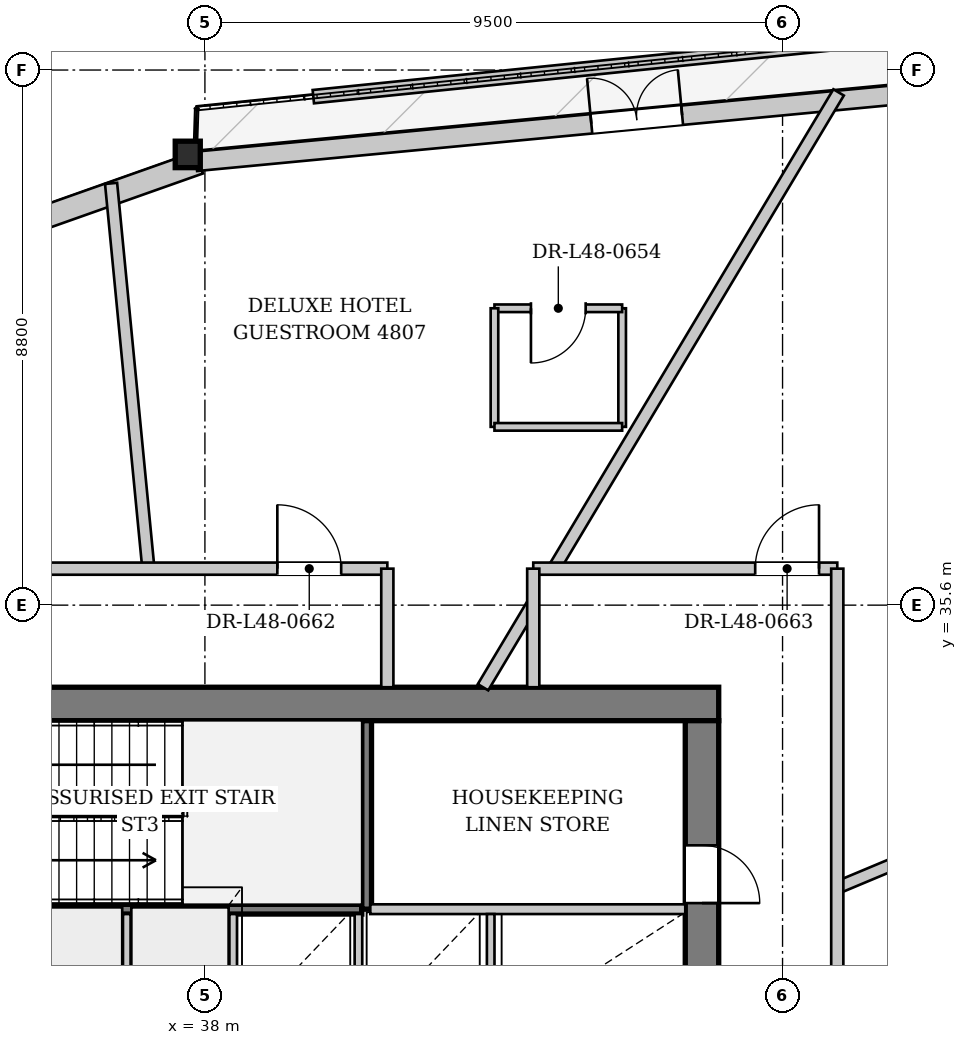
"""IFC4 building model, lengths in metres.
Left out: names, types, materials, properties, quantities, classifications, styles, units other than length and angle.
Written with IfcOpenShell. Run it as: python <this file> out.ifc"""

import sys

from ifc_helpers import new_model, si_unit, direction, frame, frame_2d, origin, origin_2d, place, context, subcontext, project, spatial, rectangle, i_section, extrude, source, transform, mapped, element, fill, save


model = new_model("IFC4")
c1 = context("Model", 3, precision=1e-05, world=origin(), true_north=direction((0.0, 1.0)))
c2 = subcontext(c1, "Body", "Model", "MODEL_VIEW")
j1 = project(units=[si_unit("LENGTHUNIT", "METRE"), si_unit("PLANEANGLEUNIT", "RADIAN")], contexts=[c1])
p1 = place(None, origin())
s1 = spatial("IfcSite", under=j1, at=p1, CompositionType="ELEMENT")
p2 = place(p1, origin())
s2 = spatial("IfcBuilding", under=s1, at=p2, CompositionType="ELEMENT")
p3 = place(p2, frame((0.0, 0.0, 182.1)))
s3 = spatial("IfcBuildingStorey", under=s2, at=p3, CompositionType="ELEMENT", Elevation=182.1)
m1 = source(origin(), c2, "Body", "SweptSolid", [
    extrude(i_section(OverallWidth=0.412, OverallDepth=0.435, WebThickness=0.031, FlangeThickness=0.05, at=origin_2d()), origin(), (0.0, 0.0, 1.0), 3.395),
])
p4 = place(p3, frame((37.842, 43.058, 0.0), z_axis=(-0.072913032199, -0.026677253398, 0.996981451125), x_axis=(0.343601453604, -0.93911556322, 0.0)))
e1 = element("IfcColumn", 1, at=p4, inside=s3, PredefinedType="COLUMN", context=c2, shape_type="MappedRepresentation", body=[
    mapped(m1, transform((0.0, 0.0, 0.0), x_axis=(1.0, 0.0, 0.0), y_axis=(0.0, 1.0, 0.0), z_axis=(0.0, 0.0, 1.0), scale=1.0)),
])
p5 = place(p3, frame((16.463, 35.293, 0.0), z_axis=(0.0, 0.0, 1.0), x_axis=(0.94274891149, 0.33350335813, 0.0)))
e2 = element("IfcWall", 2, at=p5, inside=s3, PredefinedType="SOLIDWALL", context=c2, shape_type="SweptSolid", body=[
    extrude(rectangle(XDim=22.744, YDim=0.38, at=frame_2d((11.372, 0.0))), origin(), (0.0, 0.0, 1.0), 2.722),
])
p6 = place(p5, frame((5.268, 0.0, 0.352)))
e3 = element("IfcOpeningElement", 3, at=p6, cuts=e2, PredefinedType="OPENING", context=c2, shape_type="SweptSolid", body=[
    extrude(rectangle(XDim=2.2, YDim=2.25, at=frame_2d((1.1, 1.125))), frame((0.0, 0.2, 0.0), z_axis=(0.0, -1.0, 0.0), x_axis=(1.0, 0.0, 0.0)), (0.0, 0.0, 1.0), 0.4),
])
p7 = place(p5, frame((15.276, 0.0, 0.352)))
e4 = element("IfcOpeningElement", 4, at=p7, cuts=e2, PredefinedType="OPENING", context=c2, shape_type="SweptSolid", body=[
    extrude(rectangle(XDim=2.2, YDim=2.25, at=frame_2d((1.1, 1.125))), frame((0.0, 0.2, 0.0), z_axis=(0.0, -1.0, 0.0), x_axis=(1.0, 0.0, 0.0)), (0.0, 0.0, 1.0), 0.4),
])
p8 = place(p3, frame((37.857, 42.898, 0.0), z_axis=(0.0, 0.0, 1.0), x_axis=(0.995520332202, 0.094547703155, 0.0)))
e5 = element("IfcWall", 5, at=p8, inside=s3, PredefinedType="SOLIDWALL", context=c2, shape_type="SweptSolid", body=[
    extrude(rectangle(XDim=22.744, YDim=0.32, at=frame_2d((11.372, 0.0))), origin(), (0.0, 0.0, 1.0), 2.722),
])
p9 = place(p8, frame((6.528, 0.0, 0.0)))
e6 = element("IfcOpeningElement", 6, at=p9, cuts=e5, PredefinedType="OPENING", context=c2, shape_type="SweptSolid", body=[
    extrude(rectangle(XDim=1.5, YDim=2.3, at=frame_2d((0.75, 1.15))), frame((0.0, 0.17, 0.0), z_axis=(0.0, -1.0, 0.0), x_axis=(1.0, 0.0, 0.0)), (0.0, 0.0, 1.0), 0.34),
])
p10 = place(p8, frame((15.531, 0.0, 0.252)))
e7 = element("IfcOpeningElement", 7, at=p10, cuts=e5, PredefinedType="OPENING", context=c2, shape_type="SweptSolid", body=[
    extrude(rectangle(XDim=2.6, YDim=2.35, at=frame_2d((1.3, 1.175))), frame((0.0, 0.17, 0.0), z_axis=(0.0, -1.0, 0.0), x_axis=(1.0, 0.0, 0.0)), (0.0, 0.0, 1.0), 0.34),
])
p11 = place(p3, frame((59.927, 46.017, 0.0), z_axis=(0.0, 0.0, 1.0), x_axis=(-0.994838142645, -0.101474479251, 0.0)))
e8 = element("IfcWall", 8, at=p11, inside=s3, PredefinedType="PARAPET", context=c2, shape_type="SweptSolid", body=[
    extrude(rectangle(XDim=20.248, YDim=0.22, at=frame_2d((10.124, 0.0))), origin(), (0.0, 0.0, 1.0), 0.3),
])
p12 = place(p3, frame((29.55, 33.975, 0.0), z_axis=(0.0, 0.0, 1.0), x_axis=(1.0, 0.0, 0.0)))
e9 = element("IfcWall", 9, at=p12, inside=s3, PredefinedType="SHEAR", context=c2, shape_type="SweptSolid", body=[
    extrude(rectangle(XDim=16.9, YDim=0.55, at=frame_2d((8.45, 0.0))), origin(), (0.0, 0.0, 1.0), 3.33),
])
p13 = place(p12, frame((1.55, 0.0, 0.0)))
e10 = element("IfcOpeningElement", 10, at=p13, cuts=e9, PredefinedType="OPENING", context=c2, shape_type="SweptSolid", body=[
    extrude(rectangle(XDim=0.95, YDim=2.1, at=frame_2d((0.475, 1.05))), frame((0.0, 0.285, 0.0), z_axis=(0.0, -1.0, 0.0), x_axis=(1.0, 0.0, 0.0)), (0.0, 0.0, 1.0), 0.57),
])
p14 = place(p12, frame((3.93, 0.0, 0.0)))
e11 = element("IfcOpeningElement", 11, at=p14, cuts=e9, PredefinedType="OPENING", context=c2, shape_type="SweptSolid", body=[
    extrude(rectangle(XDim=1.32, YDim=2.2, at=frame_2d((0.66, 1.1))), frame((0.0, 0.285, 0.0), z_axis=(0.0, -1.0, 0.0), x_axis=(1.0, 0.0, 0.0)), (0.0, 0.0, 1.0), 0.57),
])
p15 = place(p3, frame((46.175, 33.7, 0.0), z_axis=(0.0, 0.0, 1.0), x_axis=(0.0, -1.0, 0.0)))
e12 = element("IfcWall", 12, at=p15, inside=s3, PredefinedType="SHEAR", context=c2, shape_type="SweptSolid", body=[
    extrude(rectangle(XDim=14.2, YDim=0.55, at=frame_2d((7.1, 0.0))), origin(), (0.0, 0.0, 1.0), 3.33),
])
p16 = place(p15, frame((5.18, 0.0, 0.0)))
e13 = element("IfcOpeningElement", 13, at=p16, cuts=e12, PredefinedType="OPENING", context=c2, shape_type="SweptSolid", body=[
    extrude(rectangle(XDim=1.6, YDim=2.2, at=frame_2d((0.8, 1.1))), frame((0.0, 0.285, 0.0), z_axis=(0.0, -1.0, 0.0), x_axis=(1.0, 0.0, 0.0)), (0.0, 0.0, 1.0), 0.57),
])
p17 = place(p15, frame((2.05, 0.0, 0.0)))
e14 = element("IfcOpeningElement", 14, at=p17, cuts=e12, PredefinedType="OPENING", context=c2, shape_type="SweptSolid", body=[
    extrude(rectangle(XDim=0.95, YDim=2.1, at=frame_2d((0.475, 1.05))), frame((0.0, 0.285, 0.0), z_axis=(0.0, -1.0, 0.0), x_axis=(1.0, 0.0, 0.0)), (0.0, 0.0, 1.0), 0.57),
])
p18 = place(p3, frame((33.28, 30.6, 0.0), z_axis=(0.0, 0.0, 1.0), x_axis=(1.0, 0.0, 0.0)))
e15 = element("IfcWall", 15, at=p18, inside=s3, PredefinedType="PARTITIONING", context=c2, shape_type="SweptSolid", body=[
    extrude(rectangle(XDim=7.3, YDim=0.16, at=frame_2d((3.65, 0.0))), origin(), (0.0, 0.0, 1.0), 3.33),
])
p19 = place(p3, frame((40.66, 30.6, 0.0), z_axis=(0.0, 0.0, 1.0), x_axis=(0.0, 1.0, 0.0)))
e16 = element("IfcWall", 16, at=p19, inside=s3, PredefinedType="PARTITIONING", context=c2, shape_type="SweptSolid", body=[
    extrude(rectangle(XDim=3.1, YDim=0.16, at=frame_2d((1.55, 0.0))), origin(), (0.0, 0.0, 1.0), 3.33),
])
p20 = place(p3, frame((40.72, 30.6, 0.0), z_axis=(0.0, 0.0, 1.0), x_axis=(1.0, 0.0, 0.0)))
e17 = element("IfcWall", 17, at=p20, inside=s3, PredefinedType="PARTITIONING", context=c2, shape_type="SweptSolid", body=[
    extrude(rectangle(XDim=5.18, YDim=0.16, at=frame_2d((2.59, 0.0))), origin(), (0.0, 0.0, 1.0), 3.33),
])
for number, where, z_axis, x_axis in (
    (18, (36.715, 28.6, 0.0), (0.0, 0.0, 1.0), (0.0, 1.0, 0.0)),
    (19, (38.465, 28.6, 0.0), (0.0, 0.0, 1.0), (0.0, 1.0, 0.0)),
    (20, (40.525, 28.6, 0.0), (0.0, 0.0, 1.0), (0.0, 1.0, 0.0)),
    (21, (42.7, 28.6, 0.0), (0.0, 0.0, 1.0), (0.0, 1.0, 0.0)),
):
    element("IfcWall", number, at=place(p3, frame(where, z_axis=z_axis, x_axis=x_axis)), inside=s3, PredefinedType="PARTITIONING", context=c2, shape_type="SweptSolid", body=[
        extrude(rectangle(XDim=1.92, YDim=0.125, at=frame_2d((0.96, 0.0))), origin(), (0.0, 0.0, 1.0), 3.33),
    ])
p21 = place(p3, frame((48.4, 30.955, 0.0), z_axis=(0.0, 0.0, 1.0), x_axis=(0.922383605096, 0.386275141641, 0.0)))
e22 = element("IfcWall", 22, at=p21, inside=s3, PredefinedType="PARTITIONING", context=c2, shape_type="SweptSolid", body=[
    extrude(rectangle(XDim=11.808, YDim=0.2, at=frame_2d((5.904, 0.0))), origin(), (0.0, 0.0, 1.0), 3.33),
])
p22 = place(p3, frame((42.573, 34.25, 0.0), z_axis=(0.0, 0.0, 1.0), x_axis=(0.513135248782, 0.858307763251, 0.0)))
e23 = element("IfcWall", 23, at=p22, inside=s3, PredefinedType="PARTITIONING", context=c2, shape_type="SweptSolid", body=[
    extrude(rectangle(XDim=1.611, YDim=0.2, at=frame_2d((0.805, 0.0))), origin(), (0.0, 0.0, 1.0), 3.33),
])
p23 = place(p3, frame((43.739, 36.2, 0.0), z_axis=(0.0, 0.0, 1.0), x_axis=(0.51314560482, 0.858301571858, 0.0)))
e24 = element("IfcWall", 24, at=p23, inside=s3, PredefinedType="PARTITIONING", context=c2, shape_type="SweptSolid", body=[
    extrude(rectangle(XDim=9.125, YDim=0.2, at=frame_2d((4.562, 0.0))), origin(), (0.0, 0.0, 1.0), 3.33),
])
p24 = place(p3, frame((37.07, 36.2, 0.0), z_axis=(0.0, 0.0, 1.0), x_axis=(-0.096381803704, 0.995344436823, 0.0)))
e25 = element("IfcWall", 25, at=p24, inside=s3, PredefinedType="PARTITIONING", context=c2, shape_type="SweptSolid", body=[
    extrude(rectangle(XDim=6.365, YDim=0.2, at=frame_2d((3.183, 0.0))), origin(), (0.0, 0.0, 1.0), 3.33),
])
p25 = place(p3, frame((44.862, 38.532, 0.0), z_axis=(0.0, 0.0, 1.0), x_axis=(0.0, 1.0, 0.0)))
e26 = element("IfcWall", 26, at=p25, inside=s3, PredefinedType="PARTITIONING", context=c2, shape_type="SweptSolid", body=[
    extrude(rectangle(XDim=1.95, YDim=0.125, at=frame_2d((0.975, 0.0))), origin(), (0.0, 0.0, 1.0), 3.33),
])
p26 = place(p3, frame((44.862, 40.482, 0.0), z_axis=(0.0, 0.0, 1.0), x_axis=(-1.0, 0.0, 0.0)))
e27 = element("IfcWall", 27, at=p26, inside=s3, PredefinedType="PARTITIONING", context=c2, shape_type="SweptSolid", body=[
    extrude(rectangle(XDim=2.1, YDim=0.125, at=frame_2d((1.05, 0.0))), origin(), (0.0, 0.0, 1.0), 3.33),
])
p27 = place(p26, frame((0.6, 0.0, 0.0)))
e28 = element("IfcOpeningElement", 28, at=p27, cuts=e27, PredefinedType="OPENING", context=c2, shape_type="SweptSolid", body=[
    extrude(rectangle(XDim=0.9, YDim=2.1, at=frame_2d((0.45, 1.05))), frame((0.0, 0.073, 0.0), z_axis=(0.0, -1.0, 0.0), x_axis=(1.0, 0.0, 0.0)), (0.0, 0.0, 1.0), 0.145),
])
p28 = place(p3, frame((42.762, 40.482, 0.0), z_axis=(0.0, 0.0, 1.0), x_axis=(0.0, -1.0, 0.0)))
e29 = element("IfcWall", 29, at=p28, inside=s3, PredefinedType="PARTITIONING", context=c2, shape_type="SweptSolid", body=[
    extrude(rectangle(XDim=1.95, YDim=0.125, at=frame_2d((0.975, 0.0))), origin(), (0.0, 0.0, 1.0), 3.33),
])
p29 = place(p3, frame((42.762, 38.532, 0.0), z_axis=(0.0, 0.0, 1.0), x_axis=(1.0, 0.0, 0.0)))
e30 = element("IfcWall", 30, at=p29, inside=s3, PredefinedType="PARTITIONING", context=c2, shape_type="SweptSolid", body=[
    extrude(rectangle(XDim=2.1, YDim=0.125, at=frame_2d((1.05, 0.0))), origin(), (0.0, 0.0, 1.0), 3.33),
])
p30 = place(p3, frame((27.6, 36.2, 0.0), z_axis=(0.0, 0.0, 1.0), x_axis=(1.0, 0.0, 0.0)))
e31 = element("IfcWall", 31, at=p30, inside=s3, PredefinedType="PARTITIONING", context=c2, shape_type="SweptSolid", body=[
    extrude(rectangle(XDim=13.4, YDim=0.2, at=frame_2d((6.7, 0.0))), origin(), (0.0, 0.0, 1.0), 3.33),
])
p31 = place(p30, frame((11.591, 0.0, 0.0)))
e32 = element("IfcOpeningElement", 32, at=p31, cuts=e31, PredefinedType="OPENING", context=c2, shape_type="SweptSolid", body=[
    extrude(rectangle(XDim=1.05, YDim=2.2, at=frame_2d((0.525, 1.1))), frame((0.0, 0.11, 0.0), z_axis=(0.0, -1.0, 0.0), x_axis=(1.0, 0.0, 0.0)), (0.0, 0.0, 1.0), 0.22),
])
p32 = place(p3, frame((41.0, 34.25, 0.0), z_axis=(0.0, 0.0, 1.0), x_axis=(0.0, 1.0, 0.0)))
e33 = element("IfcWall", 33, at=p32, inside=s3, PredefinedType="PARTITIONING", context=c2, shape_type="SweptSolid", body=[
    extrude(rectangle(XDim=1.95, YDim=0.2, at=frame_2d((0.975, 0.0))), origin(), (0.0, 0.0, 1.0), 3.33),
])
p33 = place(p3, frame((43.4, 36.2, 0.0), z_axis=(0.0, 0.0, 1.0), x_axis=(1.0, 0.0, 0.0)))
e34 = element("IfcWall", 34, at=p33, inside=s3, PredefinedType="PARTITIONING", context=c2, shape_type="SweptSolid", body=[
    extrude(rectangle(XDim=5.0, YDim=0.2, at=frame_2d((2.5, 0.0))), origin(), (0.0, 0.0, 1.0), 3.33),
])
p34 = place(p33, frame((3.65, 0.0, 0.0)))
e35 = element("IfcOpeningElement", 35, at=p34, cuts=e34, PredefinedType="OPENING", context=c2, shape_type="SweptSolid", body=[
    extrude(rectangle(XDim=1.05, YDim=2.2, at=frame_2d((0.525, 1.1))), frame((0.0, 0.11, 0.0), z_axis=(0.0, -1.0, 0.0), x_axis=(1.0, 0.0, 0.0)), (0.0, 0.0, 1.0), 0.22),
])
p35 = place(p3, frame((43.4, 34.25, 0.0), z_axis=(0.0, 0.0, 1.0), x_axis=(0.0, 1.0, 0.0)))
e36 = element("IfcWall", 36, at=p35, inside=s3, PredefinedType="PARTITIONING", context=c2, shape_type="SweptSolid", body=[
    extrude(rectangle(XDim=1.95, YDim=0.2, at=frame_2d((0.975, 0.0))), origin(), (0.0, 0.0, 1.0), 3.33),
])
p36 = place(p3, frame((48.4, 17.0, 0.0), z_axis=(0.0, 0.0, 1.0), x_axis=(0.0, 1.0, 0.0)))
e37 = element("IfcWall", 37, at=p36, inside=s3, PredefinedType="PARTITIONING", context=c2, shape_type="SweptSolid", body=[
    extrude(rectangle(XDim=19.2, YDim=0.2, at=frame_2d((9.6, 0.0))), origin(), (0.0, 0.0, 1.0), 3.33),
])
p37 = place(p36, frame((9.478, 0.0, 0.0)))
e38 = element("IfcOpeningElement", 38, at=p37, cuts=e37, PredefinedType="OPENING", context=c2, shape_type="SweptSolid", body=[
    extrude(rectangle(XDim=1.05, YDim=2.2, at=frame_2d((0.525, 1.1))), frame((0.0, 0.11, 0.0), z_axis=(0.0, -1.0, 0.0), x_axis=(1.0, 0.0, 0.0)), (0.0, 0.0, 1.0), 0.22),
])
m2 = source(origin(), c2, "Body", "SweptSolid", [
    extrude(rectangle(XDim=1.5, YDim=2.3, at=frame_2d((0.75, 1.15))), frame((0.0, 0.025, 0.0), z_axis=(0.0, -1.0, 0.0), x_axis=(1.0, 0.0, 0.0)), (0.0, 0.0, 1.0), 0.05),
])
p38 = place(p9, origin())
e39 = element("IfcDoor", 39, at=p38, inside=s3, OperationType="DOUBLE_DOOR_SINGLE_SWING", PredefinedType="DOOR", context=c2, shape_type="MappedRepresentation", body=[
    mapped(m2, transform((0.0, 0.0, 0.0), x_axis=(1.0, 0.0, 0.0), y_axis=(0.0, 1.0, 0.0), z_axis=(0.0, 0.0, 1.0), scale=1.0)),
])
fill(e6, e39)
m3 = source(origin(), c2, "Body", "SweptSolid", [
    extrude(rectangle(XDim=0.95, YDim=2.1, at=frame_2d((0.475, 1.05))), frame((0.0, 0.025, 0.0), z_axis=(0.0, -1.0, 0.0), x_axis=(1.0, 0.0, 0.0)), (0.0, 0.0, 1.0), 0.05),
])
p39 = place(p17, origin())
e40 = element("IfcDoor", 40, at=p39, inside=s3, OperationType="SINGLE_SWING_RIGHT", PredefinedType="DOOR", context=c2, shape_type="MappedRepresentation", body=[
    mapped(m3, transform((0.0, 0.0, 0.0), x_axis=(1.0, 0.0, 0.0), y_axis=(0.0, 1.0, 0.0), z_axis=(0.0, 0.0, 1.0), scale=1.0)),
])
fill(e14, e40)
m4 = source(origin(), c2, "Body", "SweptSolid", [
    extrude(rectangle(XDim=0.9, YDim=2.1, at=frame_2d((0.45, 1.05))), frame((0.0, 0.025, 0.0), z_axis=(0.0, -1.0, 0.0), x_axis=(1.0, 0.0, 0.0)), (0.0, 0.0, 1.0), 0.05),
])
p40 = place(p27, origin())
e41 = element("IfcDoor", 41, at=p40, inside=s3, OperationType="SINGLE_SWING_RIGHT", PredefinedType="DOOR", context=c2, shape_type="MappedRepresentation", body=[
    mapped(m4, transform((0.0, 0.0, 0.0), x_axis=(1.0, 0.0, 0.0), y_axis=(0.0, 1.0, 0.0), z_axis=(0.0, 0.0, 1.0), scale=1.0)),
])
fill(e28, e41)
m5 = source(origin(), c2, "Body", "SweptSolid", [
    extrude(rectangle(XDim=1.05, YDim=2.2, at=frame_2d((0.525, 1.1))), frame((0.0, 0.025, 0.0), z_axis=(0.0, -1.0, 0.0), x_axis=(1.0, 0.0, 0.0)), (0.0, 0.0, 1.0), 0.05),
])
p41 = place(p31, origin())
e42 = element("IfcDoor", 42, at=p41, inside=s3, OperationType="SINGLE_SWING_LEFT", PredefinedType="DOOR", context=c2, shape_type="MappedRepresentation", body=[
    mapped(m5, transform((0.0, 0.0, 0.0), x_axis=(1.0, 0.0, 0.0), y_axis=(0.0, 1.0, 0.0), z_axis=(0.0, 0.0, 1.0), scale=1.0)),
])
fill(e32, e42)
p42 = place(p34, origin())
e43 = element("IfcDoor", 43, at=p42, inside=s3, OperationType="SINGLE_SWING_RIGHT", PredefinedType="DOOR", context=c2, shape_type="MappedRepresentation", body=[
    mapped(m5, transform((0.0, 0.0, 0.0), x_axis=(1.0, 0.0, 0.0), y_axis=(0.0, 1.0, 0.0), z_axis=(0.0, 0.0, 1.0), scale=1.0)),
])
fill(e35, e43)
save(model, sys.argv[1])
